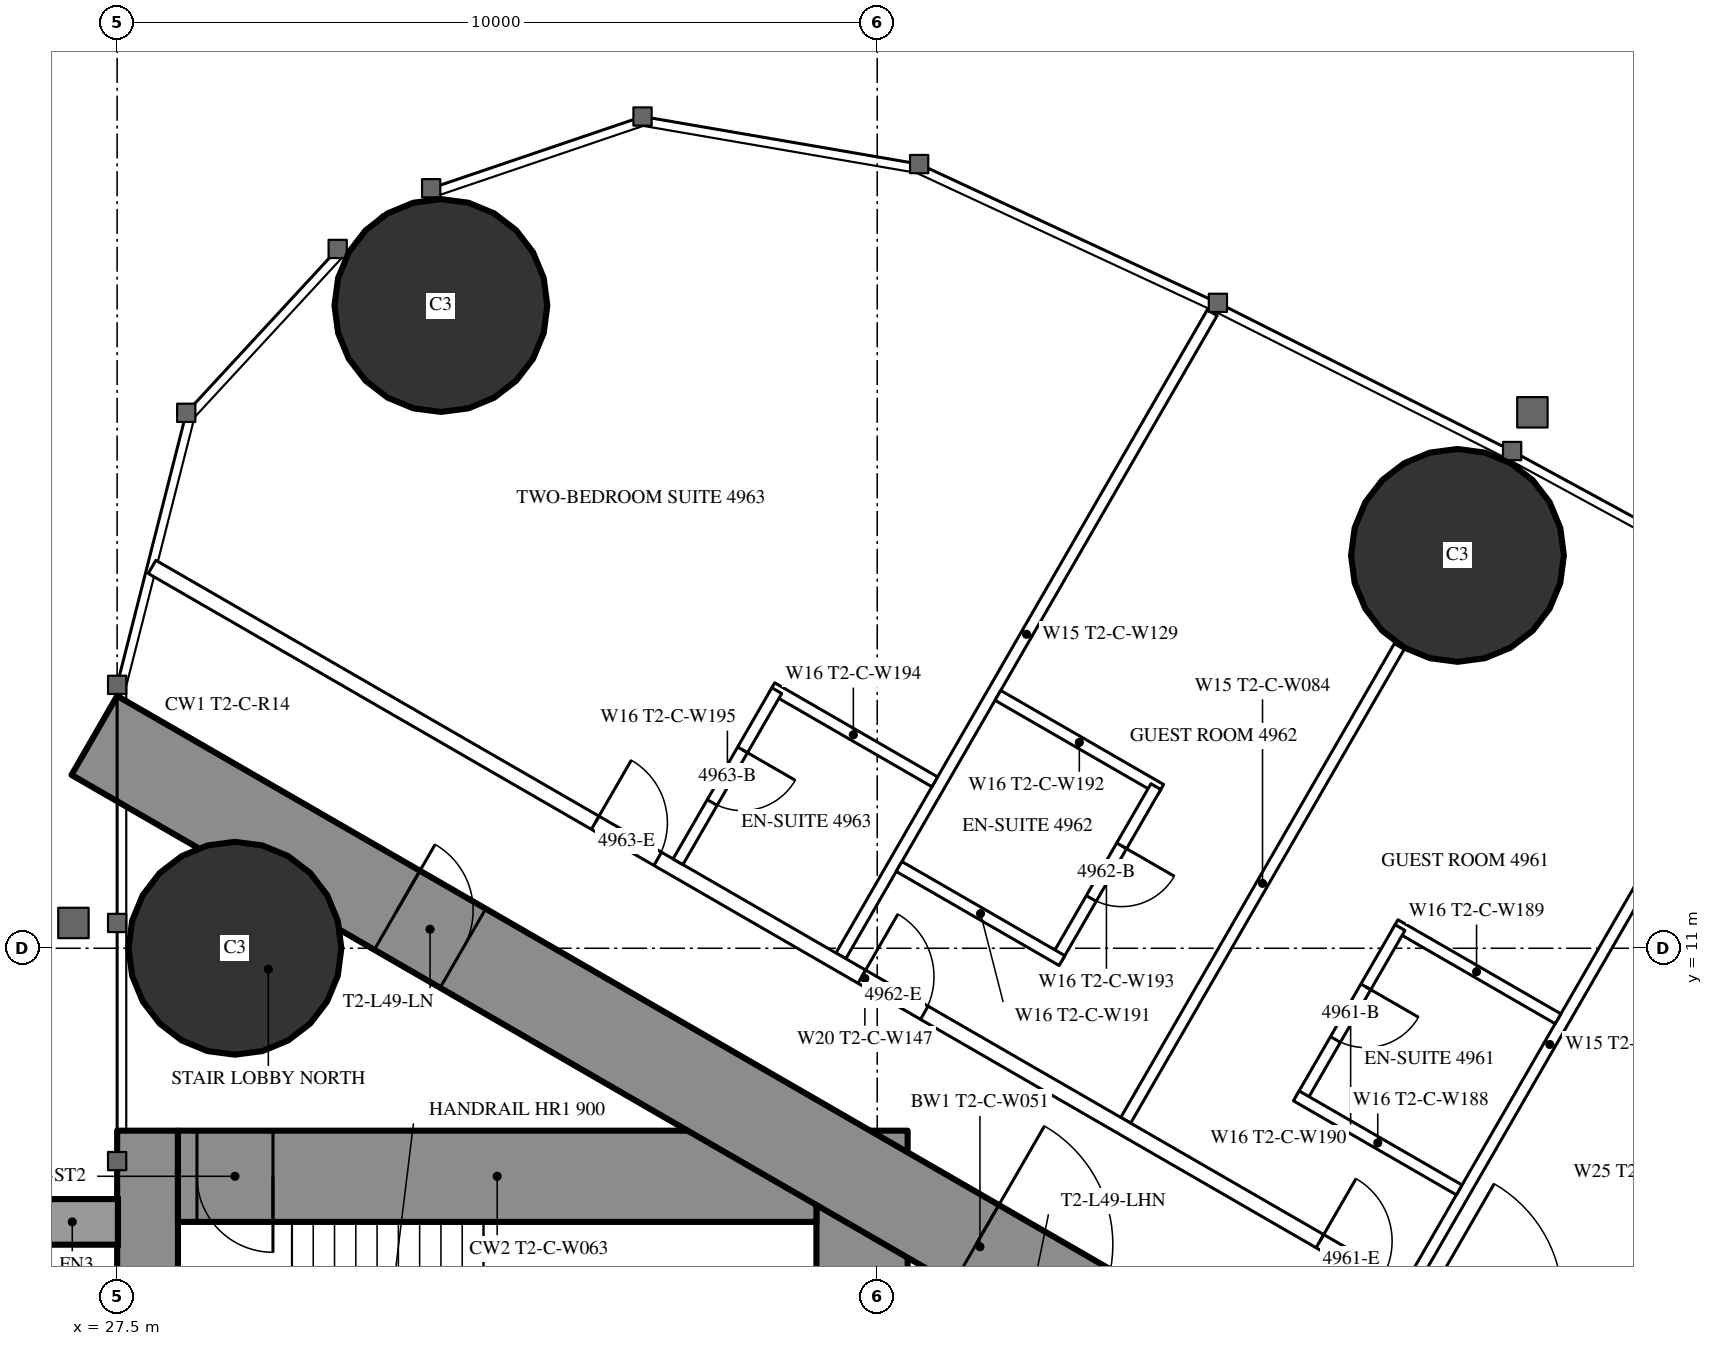
"""IFC4 building model, lengths in metres.
Left out: names, types, materials, properties, quantities, classifications, styles, units other than length and angle.
Written with IfcOpenShell. Run it as: python <this file> out.ifc"""

import sys

from ifc_helpers import new_model, si_unit, direction, frame, frame_2d, origin, origin_2d, place, context, subcontext, project, spatial, rectangle, circle, extrude, element, fill, save


model = new_model("IFC4")
c1 = context("Model", 3, precision=1e-05, world=origin(), true_north=direction((0.0, 1.0)))
c2 = subcontext(c1, "Body", "Model", "MODEL_VIEW")
j1 = project(units=[si_unit("LENGTHUNIT", "METRE"), si_unit("PLANEANGLEUNIT", "RADIAN")], contexts=[c1])
p1 = place(None, origin())
s1 = spatial("IfcSite", under=j1, at=p1, CompositionType="ELEMENT")
p2 = place(p1, origin())
s2 = spatial("IfcBuilding", under=s1, at=p2, CompositionType="ELEMENT")
p3 = place(p2, frame((0.0, 0.0, 184.3)))
s3 = spatial("IfcBuildingStorey", under=s2, at=p3, CompositionType="ELEMENT", Elevation=184.3)
for number, where, z_axis, x_axis in (
    (1, (31.76, 19.456, 0.0), (0.0, 0.0, 1.0), (1.0, 0.0, 0.0)),
    (2, (29.05, 11.0, 0.0), (0.0, 0.0, 1.0), (1.0, 0.0, 0.0)),
    (3, (45.134, 16.168, 0.0), (0.0, 0.0, 1.0), (1.0, 0.0, 0.0)),
):
    element("IfcColumn", number, at=place(p3, frame(where, z_axis=z_axis, x_axis=x_axis)), inside=s3, PredefinedType="COLUMN", context=c2, shape_type="SweptSolid", body=[
        extrude(circle(Radius=1.4, at=origin_2d()), origin(), (0.0, 0.0, 1.0), 3.5),
    ])
p4 = place(p3, frame((27.9, -8.6, 0.0), z_axis=(0.0, 0.0, 1.0), x_axis=(0.0, 1.0, 0.0)))
e4 = element("IfcWall", 4, at=p4, inside=s3, PredefinedType="SHEAR", context=c2, shape_type="SweptSolid", body=[
    extrude(rectangle(XDim=17.2, YDim=0.8, at=frame_2d((8.6, 0.0))), origin(), (0.0, 0.0, 1.0), 3.5),
])
p5 = place(p4, frame((2.45, 0.0, 0.6)))
e5 = element("IfcOpeningElement", 5, at=p5, cuts=e4, PredefinedType="OPENING", context=c2, shape_type="SweptSolid", body=[
    extrude(rectangle(XDim=0.6, YDim=2.1, at=frame_2d((0.3, 1.05))), frame((0.0, 0.41, 0.0), z_axis=(0.0, -1.0, 0.0), x_axis=(1.0, 0.0, 0.0)), (0.0, 0.0, 1.0), 0.82),
])
p6 = place(p4, frame((14.15, 0.0, 0.6)))
e6 = element("IfcOpeningElement", 6, at=p6, cuts=e4, PredefinedType="OPENING", context=c2, shape_type="SweptSolid", body=[
    extrude(rectangle(XDim=0.6, YDim=2.1, at=frame_2d((0.3, 1.05))), frame((0.0, 0.41, 0.0), z_axis=(0.0, -1.0, 0.0), x_axis=(1.0, 0.0, 0.0)), (0.0, 0.0, 1.0), 0.82),
])
p7 = place(p3, frame((37.3, -8.6, 0.0), z_axis=(0.0, 0.0, 1.0), x_axis=(0.0, 1.0, 0.0)))
e7 = element("IfcWall", 7, at=p7, inside=s3, PredefinedType="SHEAR", context=c2, shape_type="SweptSolid", body=[
    extrude(rectangle(XDim=17.2, YDim=1.2, at=frame_2d((8.6, 0.0))), origin(), (0.0, 0.0, 1.0), 3.5),
])
p8 = place(p7, frame((7.7, 0.0, 0.0)))
e8 = element("IfcOpeningElement", 8, at=p8, cuts=e7, PredefinedType="OPENING", context=c2, shape_type="SweptSolid", body=[
    extrude(rectangle(XDim=1.8, YDim=2.2, at=frame_2d((0.9, 1.1))), frame((0.0, 0.61, 0.0), z_axis=(0.0, -1.0, 0.0), x_axis=(1.0, 0.0, 0.0)), (0.0, 0.0, 1.0), 1.22),
])
p9 = place(p3, frame((28.3, 8.0, 0.0), z_axis=(0.0, 0.0, 1.0), x_axis=(1.0, 0.0, 0.0)))
e9 = element("IfcWall", 9, at=p9, inside=s3, PredefinedType="SHEAR", context=c2, shape_type="SweptSolid", body=[
    extrude(rectangle(XDim=8.4, YDim=1.2, at=frame_2d((4.2, 0.0))), origin(), (0.0, 0.0, 1.0), 3.5),
])
p10 = place(p9, frame((0.25, 0.0, 0.0)))
e10 = element("IfcOpeningElement", 10, at=p10, cuts=e9, PredefinedType="OPENING", context=c2, shape_type="SweptSolid", body=[
    extrude(rectangle(XDim=1.0, YDim=2.2, at=frame_2d((0.5, 1.1))), frame((0.0, 0.61, 0.0), z_axis=(0.0, -1.0, 0.0), x_axis=(1.0, 0.0, 0.0)), (0.0, 0.0, 1.0), 1.22),
])
p11 = place(p3, frame((27.2, 13.8, 0.0), z_axis=(0.0, 0.0, 1.0), x_axis=(0.866024515034, -0.500001539357, 0.0)))
e11 = element("IfcWall", 11, at=p11, inside=s3, PredefinedType="SHEAR", context=c2, shape_type="SweptSolid", body=[
    extrude(rectangle(XDim=26.907, YDim=1.2, at=frame_2d((13.454, 0.0))), origin(), (0.0, 0.0, 1.0), 3.5),
])
p12 = place(p11, frame((4.6, 0.0, 0.0)))
e12 = element("IfcOpeningElement", 12, at=p12, cuts=e11, PredefinedType="OPENING", context=c2, shape_type="SweptSolid", body=[
    extrude(rectangle(XDim=1.0, YDim=2.2, at=frame_2d((0.5, 1.1))), frame((0.0, 0.61, 0.0), z_axis=(0.0, -1.0, 0.0), x_axis=(1.0, 0.0, 0.0)), (0.0, 0.0, 1.0), 1.22),
])
p13 = place(p11, frame((13.395, 0.0, 0.0)))
e13 = element("IfcOpeningElement", 13, at=p13, cuts=e11, PredefinedType="OPENING", context=c2, shape_type="SweptSolid", body=[
    extrude(rectangle(XDim=1.8, YDim=2.2, at=frame_2d((0.9, 1.1))), frame((0.0, 0.61, 0.0), z_axis=(0.0, -1.0, 0.0), x_axis=(1.0, 0.0, 0.0)), (0.0, 0.0, 1.0), 1.22),
])
p14 = place(p3, frame((37.022, 10.9, 0.0), z_axis=(0.0, 0.0, 1.0), x_axis=(0.499998620953, 0.866026199976, 0.0)))
e14 = element("IfcWall", 14, at=p14, inside=s3, PredefinedType="PARTITIONING", context=c2, shape_type="SweptSolid", body=[
    extrude(rectangle(XDim=9.77, YDim=0.15, at=frame_2d((4.885, 0.0))), origin(), (0.0, 0.0, 1.0), 3.25),
])
p15 = place(p3, frame((40.769, 8.737, 0.0), z_axis=(0.0, 0.0, 1.0), x_axis=(0.500013115284, 0.866017831539, 0.0)))
e15 = element("IfcWall", 15, at=p15, inside=s3, PredefinedType="PARTITIONING", context=c2, shape_type="SweptSolid", body=[
    extrude(rectangle(XDim=7.198, YDim=0.15, at=frame_2d((3.599, 0.0))), origin(), (0.0, 0.0, 1.0), 2.3),
])
p16 = place(p3, frame((44.521, 6.571, 0.0), z_axis=(0.0, 0.0, 1.0), x_axis=(0.500020376429, 0.866013639128, 0.0)))
e16 = element("IfcWall", 16, at=p16, inside=s3, PredefinedType="PARTITIONING", context=c2, shape_type="SweptSolid", body=[
    extrude(rectangle(XDim=7.306, YDim=0.15, at=frame_2d((3.653, 0.0))), origin(), (0.0, 0.0, 1.0), 2.3),
])
p17 = place(p3, frame((27.959, 16.017, 0.0), z_axis=(0.0, 0.0, 1.0), x_axis=(0.866027146794, -0.499996981007, 0.0)))
e17 = element("IfcWall", 17, at=p17, inside=s3, PredefinedType="PARTITIONING", context=c2, shape_type="SweptSolid", body=[
    extrude(rectangle(XDim=21.657, YDim=0.2, at=frame_2d((10.829, 0.0))), origin(), (0.0, 0.0, 1.0), 3.25),
])
p18 = place(p17, frame((17.741, 0.0, 0.0)))
e18 = element("IfcOpeningElement", 18, at=p18, cuts=e17, PredefinedType="OPENING", context=c2, shape_type="SweptSolid", body=[
    extrude(rectangle(XDim=0.95, YDim=2.2, at=frame_2d((0.475, 1.1))), frame((0.0, 0.11, 0.0), z_axis=(0.0, -1.0, 0.0), x_axis=(1.0, 0.0, 0.0)), (0.0, 0.0, 1.0), 0.22),
])
p19 = place(p17, frame((10.782, 0.0, 0.0)))
e19 = element("IfcOpeningElement", 19, at=p19, cuts=e17, PredefinedType="OPENING", context=c2, shape_type="SweptSolid", body=[
    extrude(rectangle(XDim=0.95, YDim=2.2, at=frame_2d((0.475, 1.1))), frame((0.0, 0.11, 0.0), z_axis=(0.0, -1.0, 0.0), x_axis=(1.0, 0.0, 0.0)), (0.0, 0.0, 1.0), 0.22),
])
p20 = place(p17, frame((6.732, 0.0, 0.0)))
e20 = element("IfcOpeningElement", 20, at=p20, cuts=e17, PredefinedType="OPENING", context=c2, shape_type="SweptSolid", body=[
    extrude(rectangle(XDim=0.95, YDim=2.2, at=frame_2d((0.475, 1.1))), frame((0.0, 0.11, 0.0), z_axis=(0.0, -1.0, 0.0), x_axis=(1.0, 0.0, 0.0)), (0.0, 0.0, 1.0), 0.22),
])
p21 = place(p17, frame((19.349, 0.0, 0.0)))
e21 = element("IfcOpeningElement", 21, at=p21, cuts=e17, PredefinedType="OPENING", context=c2, shape_type="SweptSolid", body=[
    extrude(rectangle(XDim=1.8, YDim=2.2, at=frame_2d((0.9, 1.1))), frame((0.0, 0.11, 0.0), z_axis=(0.0, -1.0, 0.0), x_axis=(1.0, 0.0, 0.0)), (0.0, 0.0, 1.0), 0.22),
])
p22 = place(p3, frame((44.313, 11.31, 0.0), z_axis=(0.0, 0.0, 1.0), x_axis=(0.866031185235, -0.4999899861, 0.0)))
e22 = element("IfcWall", 22, at=p22, inside=s3, PredefinedType="PARTITIONING", context=c2, shape_type="SweptSolid", body=[
    extrude(rectangle(XDim=2.475, YDim=0.15, at=frame_2d((1.238, 0.0))), origin(), (0.0, 0.0, 1.0), 3.25),
])
p23 = place(p3, frame((43.078, 9.021, 0.0), z_axis=(0.0, 0.0, 1.0), x_axis=(0.49997716683, 0.86603858612, 0.0)))
e23 = element("IfcWall", 23, at=p23, inside=s3, PredefinedType="PARTITIONING", context=c2, shape_type="SweptSolid", body=[
    extrude(rectangle(XDim=2.6, YDim=0.15, at=frame_2d((1.3, 0.0))), origin(), (0.0, 0.0, 1.0), 3.25),
])
p24 = place(p23, frame((0.9, 0.0, 0.0)))
e24 = element("IfcOpeningElement", 24, at=p24, cuts=e23, PredefinedType="OPENING", context=c2, shape_type="SweptSolid", body=[
    extrude(rectangle(XDim=0.8, YDim=2.2, at=frame_2d((0.4, 1.1))), frame((0.0, 0.085, 0.0), z_axis=(0.0, -1.0, 0.0), x_axis=(1.0, 0.0, 0.0)), (0.0, 0.0, 1.0), 0.17),
])
p25 = place(p3, frame((43.013, 9.058, 0.0), z_axis=(0.0, 0.0, 1.0), x_axis=(0.866006523861, -0.500032699561, 0.0)))
e25 = element("IfcWall", 25, at=p25, inside=s3, PredefinedType="PARTITIONING", context=c2, shape_type="SweptSolid", body=[
    extrude(rectangle(XDim=2.475, YDim=0.15, at=frame_2d((1.237, 0.0))), origin(), (0.0, 0.0, 1.0), 2.45),
])
p26 = place(p3, frame((39.087, 14.327, 0.0), z_axis=(0.0, 0.0, 1.0), x_axis=(0.866006523861, -0.500032699561, 0.0)))
e26 = element("IfcWall", 26, at=p26, inside=s3, PredefinedType="PARTITIONING", context=c2, shape_type="SweptSolid", body=[
    extrude(rectangle(XDim=2.475, YDim=0.15, at=frame_2d((1.237, 0.0))), origin(), (0.0, 0.0, 1.0), 3.25),
])
p27 = place(p3, frame((39.865, 10.875, 0.0), z_axis=(0.0, 0.0, 1.0), x_axis=(0.500047596559, 0.865997922154, 0.0)))
e27 = element("IfcWall", 27, at=p27, inside=s3, PredefinedType="PARTITIONING", context=c2, shape_type="SweptSolid", body=[
    extrude(rectangle(XDim=2.6, YDim=0.15, at=frame_2d((1.3, 0.0))), origin(), (0.0, 0.0, 1.0), 3.25),
])
p28 = place(p27, frame((0.9, 0.0, 0.0)))
e28 = element("IfcOpeningElement", 28, at=p28, cuts=e27, PredefinedType="OPENING", context=c2, shape_type="SweptSolid", body=[
    extrude(rectangle(XDim=0.8, YDim=2.2, at=frame_2d((0.4, 1.1))), frame((0.0, 0.085, 0.0), z_axis=(0.0, -1.0, 0.0), x_axis=(1.0, 0.0, 0.0)), (0.0, 0.0, 1.0), 0.17),
])
for number, where, z_axis, x_axis in (
    (29, (37.787, 12.075, 0.0), (0.0, 0.0, 1.0), (0.866, -0.5, 0.0)),
    (30, (36.114, 14.427, 0.0), (0.0, 0.0, 1.0), (0.866, -0.5, 0.0)),
):
    element("IfcWall", number, at=place(p3, frame(where, z_axis=z_axis, x_axis=x_axis)), inside=s3, PredefinedType="PARTITIONING", context=c2, shape_type="SweptSolid", body=[
        extrude(rectangle(XDim=2.475, YDim=0.15, at=frame_2d((1.237, 0.0))), origin(), (0.0, 0.0, 1.0), 3.25),
    ])
p29 = place(p3, frame((34.879, 12.138, 0.0), z_axis=(0.0, 0.0, 1.0), x_axis=(0.500006934395, 0.866021400173, 0.0)))
e31 = element("IfcWall", 31, at=p29, inside=s3, PredefinedType="PARTITIONING", context=c2, shape_type="SweptSolid", body=[
    extrude(rectangle(XDim=2.6, YDim=0.15, at=frame_2d((1.3, 0.0))), origin(), (0.0, 0.0, 1.0), 3.25),
])
p30 = place(p29, frame((0.9, 0.0, 0.0)))
e32 = element("IfcOpeningElement", 32, at=p30, cuts=e31, PredefinedType="OPENING", context=c2, shape_type="SweptSolid", body=[
    extrude(rectangle(XDim=0.8, YDim=2.2, at=frame_2d((0.4, 1.1))), frame((0.0, 0.085, 0.0), z_axis=(0.0, -1.0, 0.0), x_axis=(1.0, 0.0, 0.0)), (0.0, 0.0, 1.0), 0.17),
])
p31 = place(p24, origin())
e33 = element("IfcDoor", 33, at=p31, inside=s3, OperationType="SINGLE_SWING_RIGHT", PredefinedType="DOOR", context=c2, shape_type="SweptSolid", body=[
    extrude(rectangle(XDim=0.8, YDim=2.2, at=frame_2d((0.4, 1.1))), frame((0.0, 0.025, 0.0), z_axis=(0.0, -1.0, 0.0), x_axis=(1.0, 0.0, 0.0)), (0.0, 0.0, 1.0), 0.05),
])
fill(e24, e33)
p32 = place(p18, origin())
e34 = element("IfcDoor", 34, at=p32, inside=s3, OperationType="SINGLE_SWING_LEFT", PredefinedType="DOOR", context=c2, shape_type="SweptSolid", body=[
    extrude(rectangle(XDim=0.95, YDim=2.2, at=frame_2d((0.475, 1.1))), frame((0.0, 0.025, 0.0), z_axis=(0.0, -1.0, 0.0), x_axis=(1.0, 0.0, 0.0)), (0.0, 0.0, 1.0), 0.05),
])
fill(e18, e34)
p33 = place(p28, origin())
e35 = element("IfcDoor", 35, at=p33, inside=s3, OperationType="SINGLE_SWING_RIGHT", PredefinedType="DOOR", context=c2, shape_type="SweptSolid", body=[
    extrude(rectangle(XDim=0.8, YDim=2.2, at=frame_2d((0.4, 1.1))), frame((0.0, 0.025, 0.0), z_axis=(0.0, -1.0, 0.0), x_axis=(1.0, 0.0, 0.0)), (0.0, 0.0, 1.0), 0.05),
])
fill(e28, e35)
p34 = place(p19, origin())
e36 = element("IfcDoor", 36, at=p34, inside=s3, OperationType="SINGLE_SWING_LEFT", PredefinedType="DOOR", context=c2, shape_type="SweptSolid", body=[
    extrude(rectangle(XDim=0.95, YDim=2.2, at=frame_2d((0.475, 1.1))), frame((0.0, 0.025, 0.0), z_axis=(0.0, -1.0, 0.0), x_axis=(1.0, 0.0, 0.0)), (0.0, 0.0, 1.0), 0.05),
])
fill(e19, e36)
p35 = place(p30, origin())
e37 = element("IfcDoor", 37, at=p35, inside=s3, OperationType="SINGLE_SWING_RIGHT", PredefinedType="DOOR", context=c2, shape_type="SweptSolid", body=[
    extrude(rectangle(XDim=0.8, YDim=2.2, at=frame_2d((0.4, 1.1))), frame((0.0, 0.025, 0.0), z_axis=(0.0, -1.0, 0.0), x_axis=(1.0, 0.0, 0.0)), (0.0, 0.0, 1.0), 0.05),
])
fill(e32, e37)
p36 = place(p20, origin())
e38 = element("IfcDoor", 38, at=p36, inside=s3, OperationType="SINGLE_SWING_LEFT", PredefinedType="DOOR", context=c2, shape_type="SweptSolid", body=[
    extrude(rectangle(XDim=0.95, YDim=2.2, at=frame_2d((0.475, 1.1))), frame((0.0, 0.025, 0.0), z_axis=(0.0, -1.0, 0.0), x_axis=(1.0, 0.0, 0.0)), (0.0, 0.0, 1.0), 0.05),
])
fill(e20, e38)
p37 = place(p12, origin())
e39 = element("IfcDoor", 39, at=p37, inside=s3, OperationType="SINGLE_SWING_LEFT", PredefinedType="DOOR", context=c2, shape_type="SweptSolid", body=[
    extrude(rectangle(XDim=1.0, YDim=2.2, at=frame_2d((0.5, 1.1))), frame((0.0, 0.025, 0.0), z_axis=(0.0, -1.0, 0.0), x_axis=(1.0, 0.0, 0.0)), (0.0, 0.0, 1.0), 0.05),
])
fill(e12, e39)
p38 = place(p13, origin())
e40 = element("IfcDoor", 40, at=p38, inside=s3, OperationType="DOUBLE_DOOR_SINGLE_SWING", PredefinedType="DOOR", context=c2, shape_type="SweptSolid", body=[
    extrude(rectangle(XDim=1.8, YDim=2.2, at=frame_2d((0.9, 1.1))), frame((0.0, 0.025, 0.0), z_axis=(0.0, -1.0, 0.0), x_axis=(1.0, 0.0, 0.0)), (0.0, 0.0, 1.0), 0.05),
])
fill(e13, e40)
p39 = place(p10, origin())
e41 = element("IfcDoor", 41, at=p39, inside=s3, OperationType="SINGLE_SWING_RIGHT", PredefinedType="DOOR", context=c2, shape_type="SweptSolid", body=[
    extrude(rectangle(XDim=1.0, YDim=2.2, at=frame_2d((0.5, 1.1))), frame((0.0, 0.025, 0.0), z_axis=(0.0, -1.0, 0.0), x_axis=(1.0, 0.0, 0.0)), (0.0, 0.0, 1.0), 0.05),
])
fill(e10, e41)
save(model, sys.argv[1])
